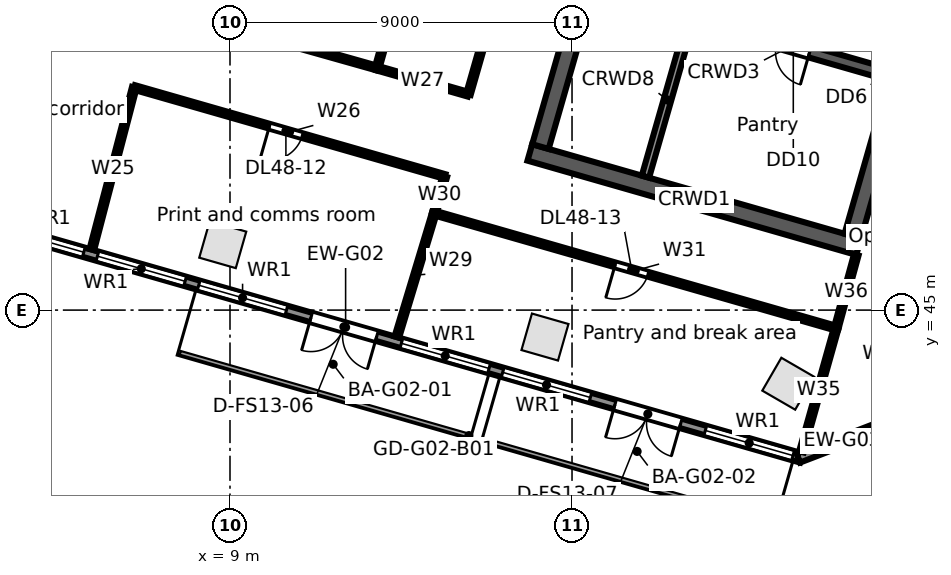
"""IFC4 building model, lengths in metres.
Left out: names, types, materials, properties, quantities, classifications, styles, units other than length and angle.
Written with IfcOpenShell. Run it as: python <this file> out.ifc"""

import sys

from ifc_helpers import new_model, si_unit, direction, frame, frame_2d, origin, origin_2d, place, context, subcontext, project, spatial, rectangle, extrude, element, fill, save


model = new_model("IFC4")
c1 = context("Model", 3, precision=1e-05, world=origin(), true_north=direction((0.0, 1.0)))
c2 = subcontext(c1, "Body", "Model", "MODEL_VIEW")
j1 = project(units=[si_unit("LENGTHUNIT", "METRE"), si_unit("PLANEANGLEUNIT", "RADIAN")], contexts=[c1])
p1 = place(None, origin())
s1 = spatial("IfcSite", under=j1, at=p1, CompositionType="ELEMENT")
p2 = place(p1, origin())
s2 = spatial("IfcBuilding", under=s1, at=p2, CompositionType="ELEMENT")
p3 = place(p2, frame((0.0, 0.0, 219.2)))
s3 = spatial("IfcBuildingStorey", under=s2, at=p3, CompositionType="ELEMENT", Elevation=219.2)
for number, where, z_axis, x_axis in (
    (1, (8.81, 46.722, 0.0), (0.0, 0.0, 1.0), (0.961, -0.276, 0.0)),
    (2, (17.288, 44.291, 0.0), (0.0, 0.0, 1.0), (0.961, -0.276, 0.0)),
    (3, (23.69, 43.063, 0.0), (0.0, 0.0, 1.0), (-0.865, 0.501, 0.0)),
):
    element("IfcColumn", number, at=place(p3, frame(where, z_axis=z_axis, x_axis=x_axis)), inside=s3, PredefinedType="COLUMN", context=c2, shape_type="SweptSolid", body=[
        extrude(rectangle(XDim=1.0, YDim=1.0, at=origin_2d()), origin(), (0.0, 0.0, 1.0), 3.9),
    ])
p4 = place(p3, frame((24.034, 41.108, 0.0), z_axis=(0.0, 0.0, 1.0), x_axis=(-0.96126060691, 0.275641153683, 0.0)))
e4 = element("IfcWall", 4, at=p4, inside=s3, PredefinedType="STANDARD", context=c2, shape_type="SweptSolid", body=[
    extrude(rectangle(XDim=24.951, YDim=0.25, at=frame_2d((12.475, 0.0))), origin(), (0.0, 0.0, 1.0), 3.62),
])
p5 = place(p4, frame((22.416, 0.0, 0.8)))
e5 = element("IfcOpeningElement", 5, at=p5, cuts=e4, PredefinedType="OPENING", context=c2, shape_type="SweptSolid", body=[
    extrude(rectangle(XDim=2.4, YDim=2.2, at=frame_2d((1.2, 1.1))), frame((0.0, 0.135, 0.0), z_axis=(0.0, -1.0, 0.0), x_axis=(1.0, 0.0, 0.0)), (0.0, 0.0, 1.0), 0.27),
])
p6 = place(p4, frame((19.643, 0.0, 0.8)))
e6 = element("IfcOpeningElement", 6, at=p6, cuts=e4, PredefinedType="OPENING", context=c2, shape_type="SweptSolid", body=[
    extrude(rectangle(XDim=2.4, YDim=2.2, at=frame_2d((1.2, 1.1))), frame((0.0, 0.135, 0.0), z_axis=(0.0, -1.0, 0.0), x_axis=(1.0, 0.0, 0.0)), (0.0, 0.0, 1.0), 0.27),
])
p7 = place(p4, frame((16.869, 0.0, 0.8)))
e7 = element("IfcOpeningElement", 7, at=p7, cuts=e4, PredefinedType="OPENING", context=c2, shape_type="SweptSolid", body=[
    extrude(rectangle(XDim=2.4, YDim=2.2, at=frame_2d((1.2, 1.1))), frame((0.0, 0.135, 0.0), z_axis=(0.0, -1.0, 0.0), x_axis=(1.0, 0.0, 0.0)), (0.0, 0.0, 1.0), 0.27),
])
p8 = place(p4, frame((14.096, 0.0, 0.8)))
e8 = element("IfcOpeningElement", 8, at=p8, cuts=e4, PredefinedType="OPENING", context=c2, shape_type="SweptSolid", body=[
    extrude(rectangle(XDim=2.4, YDim=2.2, at=frame_2d((1.2, 1.1))), frame((0.0, 0.135, 0.0), z_axis=(0.0, -1.0, 0.0), x_axis=(1.0, 0.0, 0.0)), (0.0, 0.0, 1.0), 0.27),
])
p9 = place(p4, frame((11.622, 0.0, 0.0)))
e9 = element("IfcOpeningElement", 9, at=p9, cuts=e4, PredefinedType="OPENING", context=c2, shape_type="SweptSolid", body=[
    extrude(rectangle(XDim=1.8, YDim=2.4, at=frame_2d((0.9, 1.2))), frame((0.0, 0.135, 0.0), z_axis=(0.0, -1.0, 0.0), x_axis=(1.0, 0.0, 0.0)), (0.0, 0.0, 1.0), 0.27),
])
p10 = place(p4, frame((8.549, 0.0, 0.8)))
e10 = element("IfcOpeningElement", 10, at=p10, cuts=e4, PredefinedType="OPENING", context=c2, shape_type="SweptSolid", body=[
    extrude(rectangle(XDim=2.4, YDim=2.2, at=frame_2d((1.2, 1.1))), frame((0.0, 0.135, 0.0), z_axis=(0.0, -1.0, 0.0), x_axis=(1.0, 0.0, 0.0)), (0.0, 0.0, 1.0), 0.27),
])
p11 = place(p4, frame((5.775, 0.0, 0.8)))
e11 = element("IfcOpeningElement", 11, at=p11, cuts=e4, PredefinedType="OPENING", context=c2, shape_type="SweptSolid", body=[
    extrude(rectangle(XDim=2.4, YDim=2.2, at=frame_2d((1.2, 1.1))), frame((0.0, 0.135, 0.0), z_axis=(0.0, -1.0, 0.0), x_axis=(1.0, 0.0, 0.0)), (0.0, 0.0, 1.0), 0.27),
])
p12 = place(p4, frame((3.302, 0.0, 0.0)))
e12 = element("IfcOpeningElement", 12, at=p12, cuts=e4, PredefinedType="OPENING", context=c2, shape_type="SweptSolid", body=[
    extrude(rectangle(XDim=1.8, YDim=2.4, at=frame_2d((0.9, 1.2))), frame((0.0, 0.135, 0.0), z_axis=(0.0, -1.0, 0.0), x_axis=(1.0, 0.0, 0.0)), (0.0, 0.0, 1.0), 0.27),
])
p13 = place(p4, frame((0.229, 0.0, 0.8)))
e13 = element("IfcOpeningElement", 13, at=p13, cuts=e4, PredefinedType="OPENING", context=c2, shape_type="SweptSolid", body=[
    extrude(rectangle(XDim=2.4, YDim=2.2, at=frame_2d((1.2, 1.1))), frame((0.0, 0.135, 0.0), z_axis=(0.0, -1.0, 0.0), x_axis=(1.0, 0.0, 0.0)), (0.0, 0.0, 1.0), 0.27),
])
p14 = place(p3, frame((26.27, 41.993, 0.0), z_axis=(0.0, 0.0, 1.0), x_axis=(-0.933573798066, -0.358385216722, 0.0)))
e14 = element("IfcWall", 14, at=p14, inside=s3, PredefinedType="STANDARD", context=c2, shape_type="SweptSolid", body=[
    extrude(rectangle(XDim=2.48, YDim=0.25, at=frame_2d((1.24, 0.0))), origin(), (0.0, 0.0, 1.0), 3.62),
])
p15 = place(p3, frame((16.89, 49.149, 0.0), z_axis=(0.0, 0.0, 1.0), x_axis=(0.96126248289, -0.275634611374, 0.0)))
e15 = element("IfcWall", 15, at=p15, inside=s3, PredefinedType="SOLIDWALL", context=c2, shape_type="SweptSolid", body=[
    extrude(rectangle(XDim=9.0, YDim=0.45, at=frame_2d((4.5, 0.0))), origin(), (0.0, 0.0, 1.0), 3.62),
])
p16 = place(p3, frame((21.131, 52.692, 0.0), z_axis=(0.0, 0.0, 1.0), x_axis=(0.961261488075, -0.275638080722, 0.0)))
e16 = element("IfcWall", 16, at=p16, inside=s3, PredefinedType="SOLIDWALL", context=c2, shape_type="SweptSolid", body=[
    extrude(rectangle(XDim=5.45, YDim=0.3, at=frame_2d((2.725, 0.0))), origin(), (0.0, 0.0, 1.0), 3.62),
])
p17 = place(p16, frame((2.35, 0.0, 0.0)))
e17 = element("IfcOpeningElement", 17, at=p17, cuts=e16, PredefinedType="OPENING", context=c2, shape_type="SweptSolid", body=[
    extrude(rectangle(XDim=0.9, YDim=2.1, at=frame_2d((0.45, 1.05))), frame((0.0, 0.16, 0.0), z_axis=(0.0, -1.0, 0.0), x_axis=(1.0, 0.0, 0.0)), (0.0, 0.0, 1.0), 0.32),
])
p18 = place(p3, frame((17.168, 49.303, 0.0), z_axis=(0.0, 0.0, 1.0), x_axis=(0.275638974822, 0.961261231695, 0.0)))
e18 = element("IfcWall", 18, at=p18, inside=s3, PredefinedType="SOLIDWALL", context=c2, shape_type="SweptSolid", body=[
    extrude(rectangle(XDim=11.1, YDim=0.45, at=frame_2d((5.55, 0.0))), origin(), (0.0, 0.0, 1.0), 3.62),
])
p19 = place(p18, frame((4.95, 0.0, 0.0)))
e19 = element("IfcOpeningElement", 19, at=p19, cuts=e18, PredefinedType="OPENING", context=c2, shape_type="SweptSolid", body=[
    extrude(rectangle(XDim=1.2, YDim=2.1, at=frame_2d((0.6, 1.05))), frame((0.0, 0.235, 0.0), z_axis=(0.0, -1.0, 0.0), x_axis=(1.0, 0.0, 0.0)), (0.0, 0.0, 1.0), 0.47),
])
p20 = place(p3, frame((19.932, 48.511, 0.0), z_axis=(0.0, 0.0, 1.0), x_axis=(0.275642273411, 0.961260285827, 0.0)))
e20 = element("IfcWall", 20, at=p20, inside=s3, PredefinedType="SOLIDWALL", context=c2, shape_type="SweptSolid", body=[
    extrude(rectangle(XDim=4.2, YDim=0.2, at=frame_2d((2.1, 0.0))), origin(), (0.0, 0.0, 1.0), 3.62),
])
p21 = place(p3, frame((25.387, 46.947, 0.0), z_axis=(0.0, 0.0, 1.0), x_axis=(0.275638974822, 0.961261231695, 0.0)))
e21 = element("IfcWall", 21, at=p21, inside=s3, PredefinedType="SOLIDWALL", context=c2, shape_type="SweptSolid", body=[
    extrude(rectangle(XDim=11.1, YDim=0.45, at=frame_2d((5.55, 0.0))), origin(), (0.0, 0.0, 1.0), 3.62),
])
p22 = place(p21, frame((4.95, 0.0, 0.0)))
e22 = element("IfcOpeningElement", 22, at=p22, cuts=e21, PredefinedType="OPENING", context=c2, shape_type="SweptSolid", body=[
    extrude(rectangle(XDim=1.2, YDim=2.1, at=frame_2d((0.6, 1.05))), frame((0.0, 0.235, 0.0), z_axis=(0.0, -1.0, 0.0), x_axis=(1.0, 0.0, 0.0)), (0.0, 0.0, 1.0), 0.47),
])
p23 = place(p3, frame((0.0, 55.0, 0.0), z_axis=(0.0, 0.0, 1.0), x_axis=(0.962402937884, -0.271625818271, 0.0)))
e23 = element("IfcWall", 23, at=p23, inside=s3, PredefinedType="PARTITIONING", context=c2, shape_type="SweptSolid", body=[
    extrude(rectangle(XDim=13.372, YDim=0.125, at=frame_2d((6.686, 0.0))), origin(), (0.0, 0.0, 1.0), 2.8),
])
p24 = place(p23, frame((5.7, 0.0, 0.0)))
e24 = element("IfcOpeningElement", 24, at=p24, cuts=e23, PredefinedType="OPENING", context=c2, shape_type="SweptSolid", body=[
    extrude(rectangle(XDim=1.8, YDim=2.1, at=frame_2d((0.9, 1.05))), frame((0.0, 0.073, 0.0), z_axis=(0.0, -1.0, 0.0), x_axis=(1.0, 0.0, 0.0)), (0.0, 0.0, 1.0), 0.145),
])
p25 = place(p3, frame((5.364, 46.592, 0.0), z_axis=(0.0, 0.0, 1.0), x_axis=(0.253446952203, 0.967349286669, 0.0)))
e25 = element("IfcWall", 25, at=p25, inside=s3, PredefinedType="PARTITIONING", context=c2, shape_type="SweptSolid", body=[
    extrude(rectangle(XDim=4.411, YDim=0.125, at=frame_2d((2.206, 0.0))), origin(), (0.0, 0.0, 1.0), 2.988),
])
p26 = place(p3, frame((6.482, 50.859, 0.0), z_axis=(0.0, 0.0, 1.0), x_axis=(0.961261196169, -0.275639098713, 0.0)))
e26 = element("IfcWall", 26, at=p26, inside=s3, PredefinedType="PARTITIONING", context=c2, shape_type="SweptSolid", body=[
    extrude(rectangle(XDim=8.5, YDim=0.125, at=frame_2d((4.25, 0.0))), origin(), (0.0, 0.0, 1.0), 2.8),
])
p27 = place(p26, frame((3.7, 0.0, 0.0)))
e27 = element("IfcOpeningElement", 27, at=p27, cuts=e26, PredefinedType="OPENING", context=c2, shape_type="SweptSolid", body=[
    extrude(rectangle(XDim=0.9, YDim=2.1, at=frame_2d((0.45, 1.05))), frame((0.0, 0.073, 0.0), z_axis=(0.0, -1.0, 0.0), x_axis=(1.0, 0.0, 0.0)), (0.0, 0.0, 1.0), 0.145),
])
p28 = place(p3, frame((12.869, 51.368, 0.0), z_axis=(0.0, 0.0, 1.0), x_axis=(0.961302601161, -0.275494662382, 0.0)))
e28 = element("IfcWall", 28, at=p28, inside=s3, PredefinedType="PARTITIONING", context=c2, shape_type="SweptSolid", body=[
    extrude(rectangle(XDim=2.501, YDim=0.125, at=frame_2d((1.25, 0.0))), origin(), (0.0, 0.0, 1.0), 3.62),
])
p29 = place(p3, frame((12.869, 51.368, 0.0), z_axis=(0.0, 0.0, 1.0), x_axis=(0.269547555311, 0.962987079574, 0.0)))
e29 = element("IfcWall", 29, at=p29, inside=s3, PredefinedType="PARTITIONING", context=c2, shape_type="SweptSolid", body=[
    extrude(rectangle(XDim=16.161, YDim=0.125, at=frame_2d((8.081, 0.0))), origin(), (0.0, 0.0, 1.0), 2.792),
])
p30 = place(p3, frame((13.39, 44.29, 0.0), z_axis=(0.0, 0.0, 1.0), x_axis=(0.289389501276, 0.957211427299, 0.0)))
e30 = element("IfcWall", 30, at=p30, inside=s3, PredefinedType="PARTITIONING", context=c2, shape_type="SweptSolid", body=[
    extrude(rectangle(XDim=3.411, YDim=0.125, at=frame_2d((1.706, 0.0))), origin(), (0.0, 0.0, 1.0), 2.994),
])
p31 = place(p3, frame((14.377, 47.555, 0.0), z_axis=(0.0, 0.0, 1.0), x_axis=(0.275204870584, 0.961385603807, 0.0)))
e31 = element("IfcWall", 31, at=p31, inside=s3, PredefinedType="PARTITIONING", context=c2, shape_type="SweptSolid", body=[
    extrude(rectangle(XDim=1.0, YDim=0.125, at=frame_2d((0.5, 0.0))), origin(), (0.0, 0.0, 1.0), 3.62),
])
p32 = place(p3, frame((14.377, 47.555, 0.0), z_axis=(0.0, 0.0, 1.0), x_axis=(0.961263044958, -0.275632651182, 0.0)))
e32 = element("IfcWall", 32, at=p32, inside=s3, PredefinedType="PARTITIONING", context=c2, shape_type="SweptSolid", body=[
    extrude(rectangle(XDim=11.0, YDim=0.125, at=frame_2d((5.5, 0.0))), origin(), (0.0, 0.0, 1.0), 2.9),
])
p33 = place(p32, frame((4.95, 0.0, 0.0)))
e33 = element("IfcOpeningElement", 33, at=p33, cuts=e32, PredefinedType="OPENING", context=c2, shape_type="SweptSolid", body=[
    extrude(rectangle(XDim=0.9, YDim=2.1, at=frame_2d((0.45, 1.05))), frame((0.0, 0.073, 0.0), z_axis=(0.0, -1.0, 0.0), x_axis=(1.0, 0.0, 0.0)), (0.0, 0.0, 1.0), 0.145),
])
p34 = place(p3, frame((15.273, 50.679, 0.0), z_axis=(0.0, 0.0, 1.0), x_axis=(0.275494973205, 0.961302512084, 0.0)))
e34 = element("IfcWall", 34, at=p34, inside=s3, PredefinedType="PARTITIONING", context=c2, shape_type="SweptSolid", body=[
    extrude(rectangle(XDim=5.75, YDim=0.125, at=frame_2d((2.875, 0.0))), origin(), (0.0, 0.0, 1.0), 2.8),
])
p35 = place(p34, frame((2.45, 0.0, 0.0)))
e35 = element("IfcOpeningElement", 35, at=p35, cuts=e34, PredefinedType="OPENING", context=c2, shape_type="SweptSolid", body=[
    extrude(rectangle(XDim=0.9, YDim=2.1, at=frame_2d((0.45, 1.05))), frame((0.0, 0.073, 0.0), z_axis=(0.0, -1.0, 0.0), x_axis=(1.0, 0.0, 0.0)), (0.0, 0.0, 1.0), 0.145),
])
p36 = place(p3, frame((24.036, 41.27, 0.0), z_axis=(0.0, 0.0, 1.0), x_axis=(0.270787421954, 0.962639170256, 0.0)))
e36 = element("IfcWall", 36, at=p36, inside=s3, PredefinedType="PARTITIONING", context=c2, shape_type="SweptSolid", body=[
    extrude(rectangle(XDim=3.379, YDim=0.125, at=frame_2d((1.689, 0.0))), origin(), (0.0, 0.0, 1.0), 2.9),
])
p37 = place(p3, frame((24.951, 44.523, 0.0), z_axis=(0.0, 0.0, 1.0), x_axis=(0.264046927145, 0.964509834198, 0.0)))
e37 = element("IfcWall", 37, at=p37, inside=s3, PredefinedType="PARTITIONING", context=c2, shape_type="SweptSolid", body=[
    extrude(rectangle(XDim=2.0, YDim=0.125, at=frame_2d((1.0, 0.0))), origin(), (0.0, 0.0, 1.0), 2.9),
])
p38 = place(p6, origin())
e38 = element("IfcWindow", 38, at=p38, inside=s3, PartitioningType="SINGLE_PANEL", PredefinedType="WINDOW", context=c2, shape_type="SweptSolid", body=[
    extrude(rectangle(XDim=2.4, YDim=2.2, at=frame_2d((1.2, 1.1))), frame((0.0, 0.03, 0.0), z_axis=(0.0, -1.0, 0.0), x_axis=(1.0, 0.0, 0.0)), (0.0, 0.0, 1.0), 0.06),
])
fill(e6, e38)
p39 = place(p7, origin())
e39 = element("IfcWindow", 39, at=p39, inside=s3, PartitioningType="SINGLE_PANEL", PredefinedType="WINDOW", context=c2, shape_type="SweptSolid", body=[
    extrude(rectangle(XDim=2.4, YDim=2.2, at=frame_2d((1.2, 1.1))), frame((0.0, 0.03, 0.0), z_axis=(0.0, -1.0, 0.0), x_axis=(1.0, 0.0, 0.0)), (0.0, 0.0, 1.0), 0.06),
])
fill(e7, e39)
p40 = place(p8, origin())
e40 = element("IfcWindow", 40, at=p40, inside=s3, PartitioningType="SINGLE_PANEL", PredefinedType="WINDOW", context=c2, shape_type="SweptSolid", body=[
    extrude(rectangle(XDim=2.4, YDim=2.2, at=frame_2d((1.2, 1.1))), frame((0.0, 0.03, 0.0), z_axis=(0.0, -1.0, 0.0), x_axis=(1.0, 0.0, 0.0)), (0.0, 0.0, 1.0), 0.06),
])
fill(e8, e40)
p41 = place(p9, origin())
e41 = element("IfcDoor", 41, at=p41, inside=s3, OperationType="DOUBLE_DOOR_SINGLE_SWING", PredefinedType="DOOR", context=c2, shape_type="SweptSolid", body=[
    extrude(rectangle(XDim=1.8, YDim=2.4, at=frame_2d((0.9, 1.2))), frame((0.0, 0.025, 0.0), z_axis=(0.0, -1.0, 0.0), x_axis=(1.0, 0.0, 0.0)), (0.0, 0.0, 1.0), 0.05),
])
fill(e9, e41)
p42 = place(p10, origin())
e42 = element("IfcWindow", 42, at=p42, inside=s3, PartitioningType="SINGLE_PANEL", PredefinedType="WINDOW", context=c2, shape_type="SweptSolid", body=[
    extrude(rectangle(XDim=2.4, YDim=2.2, at=frame_2d((1.2, 1.1))), frame((0.0, 0.03, 0.0), z_axis=(0.0, -1.0, 0.0), x_axis=(1.0, 0.0, 0.0)), (0.0, 0.0, 1.0), 0.06),
])
fill(e10, e42)
p43 = place(p11, origin())
e43 = element("IfcWindow", 43, at=p43, inside=s3, PartitioningType="SINGLE_PANEL", PredefinedType="WINDOW", context=c2, shape_type="SweptSolid", body=[
    extrude(rectangle(XDim=2.4, YDim=2.2, at=frame_2d((1.2, 1.1))), frame((0.0, 0.03, 0.0), z_axis=(0.0, -1.0, 0.0), x_axis=(1.0, 0.0, 0.0)), (0.0, 0.0, 1.0), 0.06),
])
fill(e11, e43)
p44 = place(p12, origin())
e44 = element("IfcDoor", 44, at=p44, inside=s3, OperationType="DOUBLE_DOOR_SINGLE_SWING", PredefinedType="DOOR", context=c2, shape_type="SweptSolid", body=[
    extrude(rectangle(XDim=1.8, YDim=2.4, at=frame_2d((0.9, 1.2))), frame((0.0, 0.025, 0.0), z_axis=(0.0, -1.0, 0.0), x_axis=(1.0, 0.0, 0.0)), (0.0, 0.0, 1.0), 0.05),
])
fill(e12, e44)
p45 = place(p13, origin())
e45 = element("IfcWindow", 45, at=p45, inside=s3, PartitioningType="SINGLE_PANEL", PredefinedType="WINDOW", context=c2, shape_type="SweptSolid", body=[
    extrude(rectangle(XDim=2.4, YDim=2.2, at=frame_2d((1.2, 1.1))), frame((0.0, 0.03, 0.0), z_axis=(0.0, -1.0, 0.0), x_axis=(1.0, 0.0, 0.0)), (0.0, 0.0, 1.0), 0.06),
])
fill(e13, e45)
p46 = place(p17, frame((0.9, 0.0, 0.0), z_axis=(0.0, 0.0, 1.0), x_axis=(-1.0, 0.0, 0.0)))
e46 = element("IfcDoor", 46, at=p46, inside=s3, OperationType="SINGLE_SWING_LEFT", PredefinedType="DOOR", context=c2, shape_type="SweptSolid", body=[
    extrude(rectangle(XDim=0.9, YDim=2.1, at=frame_2d((0.45, 1.05))), frame((0.0, 0.025, 0.0), z_axis=(0.0, -1.0, 0.0), x_axis=(1.0, 0.0, 0.0)), (0.0, 0.0, 1.0), 0.05),
])
fill(e17, e46)
p47 = place(p27, frame((0.9, 0.0, 0.0), z_axis=(0.0, 0.0, 1.0), x_axis=(-1.0, 0.0, 0.0)))
e47 = element("IfcDoor", 47, at=p47, inside=s3, OperationType="SINGLE_SWING_RIGHT", PredefinedType="DOOR", context=c2, shape_type="SweptSolid", body=[
    extrude(rectangle(XDim=0.9, YDim=2.1, at=frame_2d((0.45, 1.05))), frame((0.0, 0.025, 0.0), z_axis=(0.0, -1.0, 0.0), x_axis=(1.0, 0.0, 0.0)), (0.0, 0.0, 1.0), 0.05),
])
fill(e27, e47)
p48 = place(p33, frame((0.9, 0.0, 0.0), z_axis=(0.0, 0.0, 1.0), x_axis=(-1.0, 0.0, 0.0)))
e48 = element("IfcDoor", 48, at=p48, inside=s3, OperationType="SINGLE_SWING_RIGHT", PredefinedType="DOOR", context=c2, shape_type="SweptSolid", body=[
    extrude(rectangle(XDim=0.9, YDim=2.1, at=frame_2d((0.45, 1.05))), frame((0.0, 0.025, 0.0), z_axis=(0.0, -1.0, 0.0), x_axis=(1.0, 0.0, 0.0)), (0.0, 0.0, 1.0), 0.05),
])
fill(e33, e48)
save(model, sys.argv[1])
